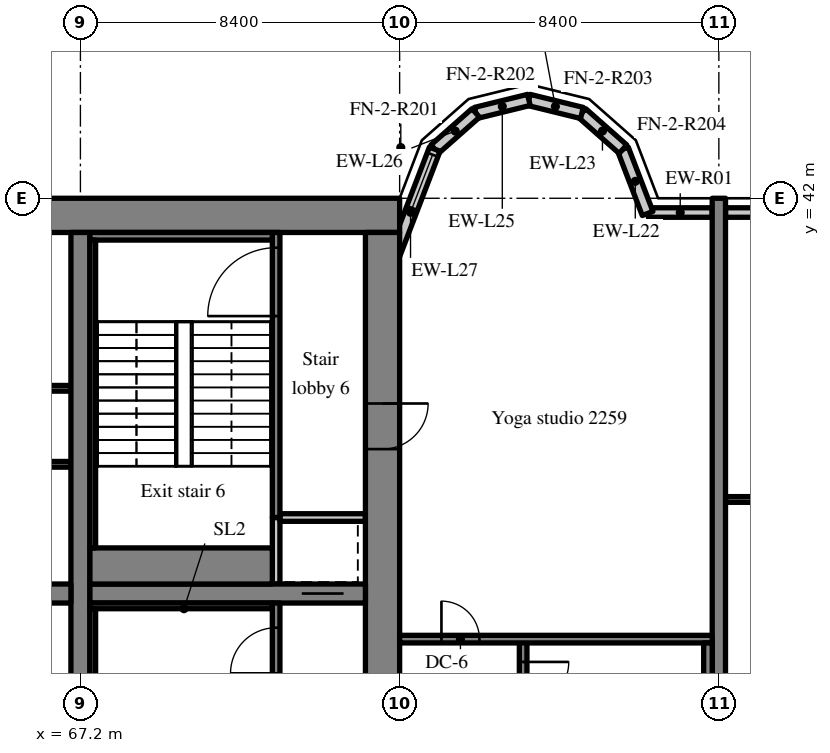
"""IFC4 building model, lengths in metres.
Left out: names, types, materials, properties, quantities, classifications, styles, units other than length and angle.
Written with IfcOpenShell. Run it as: python <this file> out.ifc"""

import sys

from ifc_helpers import new_model, si_unit, direction, frame, frame_2d, origin, place, context, subcontext, project, spatial, rectangle, extrude, source, transform, mapped, element, fill, save


model = new_model("IFC4")
c1 = context("Model", 3, precision=1e-05, world=origin(), true_north=direction((0.0, 1.0)))
c2 = subcontext(c1, "Body", "Model", "MODEL_VIEW")
j1 = project(units=[si_unit("LENGTHUNIT", "METRE"), si_unit("PLANEANGLEUNIT", "RADIAN")], contexts=[c1])
p1 = place(None, origin())
s1 = spatial("IfcSite", under=j1, at=p1, CompositionType="ELEMENT")
p2 = place(p1, origin())
s2 = spatial("IfcBuilding", under=s1, at=p2, CompositionType="ELEMENT")
p3 = place(p2, frame((0.0, 0.0, 95.2)))
s3 = spatial("IfcBuildingStorey", under=s2, at=p3, CompositionType="ELEMENT", Elevation=95.2)
m1 = source(origin(), c2, "Body", "SweptSolid", [
    extrude(rectangle(XDim=50.4, YDim=0.9, at=frame_2d((25.2, 0.0))), origin(), (0.0, 0.0, 1.0), 3.52),
])
p4 = place(p3, frame((25.2, 41.55, 0.0), z_axis=(0.0, 0.0, 1.0), x_axis=(1.0, 0.0, 0.0)))
e1 = element("IfcWall", 1, at=p4, inside=s3, PredefinedType="SHEAR", context=c2, shape_type="MappedRepresentation", body=[
    mapped(m1, transform((0.0, 0.0, 0.0), scale=1.0)),
])
m2 = source(origin(), c2, "Body", "SweptSolid", [
    extrude(rectangle(XDim=18.2, YDim=0.9, at=frame_2d((9.1, 0.0))), origin(), (0.0, 0.0, 1.0), 3.52),
])
p5 = place(p3, frame((75.15, 22.9, 0.0), z_axis=(0.0, 0.0, 1.0), x_axis=(0.0, 1.0, 0.0)))
e2 = element("IfcWall", 2, at=p5, inside=s3, PredefinedType="SHEAR", context=c2, shape_type="MappedRepresentation", body=[
    mapped(m2, transform((0.0, 0.0, 0.0), scale=1.0)),
])
m3 = source(origin(), c2, "Body", "SweptSolid", [
    extrude(rectangle(XDim=1.2, YDim=2.1, at=frame_2d((0.6, 1.05))), frame((0.0, 0.46, 0.0), z_axis=(0.0, -1.0, 0.0), x_axis=(1.0, 0.0, 0.0)), (0.0, 0.0, 1.0), 0.92),
])
p6 = place(p5, frame((12.5, 0.0, 0.0)))
e3 = element("IfcOpeningElement", 3, at=p6, cuts=e2, PredefinedType="OPENING", context=c2, shape_type="MappedRepresentation", body=[
    mapped(m3, transform((0.0, 0.0, 0.0), scale=1.0)),
])
m4 = source(origin(), c2, "Body", "SweptSolid", [
    extrude(rectangle(XDim=18.2, YDim=0.5, at=frame_2d((9.1, 0.0))), origin(), (0.0, 0.0, 1.0), 3.52),
])
p7 = place(p3, frame((67.2, 22.9, 0.0), z_axis=(0.0, 0.0, 1.0), x_axis=(0.0, 1.0, 0.0)))
e4 = element("IfcWall", 4, at=p7, inside=s3, PredefinedType="SHEAR", context=c2, shape_type="MappedRepresentation", body=[
    mapped(m4, transform((0.0, 0.0, 0.0), scale=1.0)),
])
m5 = source(origin(), c2, "Body", "SweptSolid", [
    extrude(rectangle(XDim=16.3, YDim=0.5, at=frame_2d((8.15, 0.0))), origin(), (0.0, 0.0, 1.0), 3.52),
])
p8 = place(p3, frame((50.65, 31.6, 0.0), z_axis=(0.0, 0.0, 1.0), x_axis=(1.0, 0.0, 0.0)))
e5 = element("IfcWall", 5, at=p8, inside=s3, PredefinedType="SHEAR", context=c2, shape_type="MappedRepresentation", body=[
    mapped(m5, transform((0.0, 0.0, 0.0), scale=1.0)),
])
m6 = source(origin(), c2, "Body", "SweptSolid", [
    extrude(rectangle(XDim=1.0, YDim=2.1, at=frame_2d((0.5, 1.05))), frame((0.0, 0.26, 0.0), z_axis=(0.0, -1.0, 0.0), x_axis=(1.0, 0.0, 0.0)), (0.0, 0.0, 1.0), 0.52),
])
p9 = place(p8, frame((0.575, 0.0, 0.0)))
e6 = element("IfcOpeningElement", 6, at=p9, cuts=e5, PredefinedType="OPENING", context=c2, shape_type="MappedRepresentation", body=[
    mapped(m6, transform((0.0, 0.0, 0.0), scale=1.0)),
])
m7 = source(origin(), c2, "Body", "SweptSolid", [
    extrude(rectangle(XDim=7.25, YDim=0.5, at=frame_2d((3.625, 0.0))), origin(), (0.0, 0.0, 1.0), 3.52),
])
p10 = place(p3, frame((67.45, 31.6, 0.0), z_axis=(0.0, 0.0, 1.0), x_axis=(1.0, 0.0, 0.0)))
e7 = element("IfcWall", 7, at=p10, inside=s3, PredefinedType="SHEAR", context=c2, shape_type="MappedRepresentation", body=[
    mapped(m7, transform((0.0, 0.0, 0.0), scale=1.0)),
])
m8 = source(origin(), c2, "Body", "SweptSolid", [
    extrude(rectangle(XDim=1.1, YDim=2.1, at=frame_2d((0.55, 1.05))), frame((0.0, 0.26, 0.0), z_axis=(0.0, -1.0, 0.0), x_axis=(1.0, 0.0, 0.0)), (0.0, 0.0, 1.0), 0.52),
])
p11 = place(p10, frame((5.575, 0.0, 0.0)))
e8 = element("IfcOpeningElement", 8, at=p11, cuts=e7, PredefinedType="OPENING", context=c2, shape_type="MappedRepresentation", body=[
    mapped(m8, transform((0.0, 0.0, 0.0), scale=1.0)),
])
m9 = source(origin(), c2, "Body", "SweptSolid", [
    extrude(rectangle(XDim=20.0, YDim=0.35, at=frame_2d((10.0, 0.0))), origin(), (0.0, 0.0, 1.0), 3.52),
])
p12 = place(p3, frame((84.0, 22.0, 0.0), z_axis=(0.0, 0.0, 1.0), x_axis=(0.0, 1.0, 0.0)))
e9 = element("IfcWall", 9, at=p12, inside=s3, PredefinedType="SHEAR", context=c2, shape_type="MappedRepresentation", body=[
    mapped(m9, transform((0.0, 0.0, 0.0), scale=1.0)),
])
m10 = source(origin(), c2, "Body", "SweptSolid", [
    extrude(rectangle(XDim=1.683, YDim=0.25, at=frame_2d((0.841, 0.0))), origin(), (0.0, 0.0, 1.0), 2.82),
])
p13 = place(p3, frame((83.825, 41.625, 0.0), z_axis=(0.0, 0.0, 1.0), x_axis=(-1.0, 0.0, 0.0)))
e10 = element("IfcWall", 10, at=p13, inside=s3, PredefinedType="SOLIDWALL", context=c2, shape_type="MappedRepresentation", body=[
    mapped(m10, transform((0.0, 0.0, 0.0), scale=1.0)),
])
m11 = source(origin(), c2, "Body", "SweptSolid", [
    extrude(rectangle(XDim=3.675, YDim=0.25, at=frame_2d((1.837, 0.0))), origin(), (0.0, 0.0, 1.0), 2.82),
])
p14 = place(p3, frame((87.85, 41.625, 0.0), z_axis=(0.0, 0.0, 1.0), x_axis=(-1.0, 0.0, 0.0)))
e11 = element("IfcWall", 11, at=p14, inside=s3, PredefinedType="SOLIDWALL", context=c2, shape_type="MappedRepresentation", body=[
    mapped(m11, transform((0.0, 0.0, 0.0), scale=1.0)),
])
m12 = source(origin(), c2, "Body", "SweptSolid", [
    extrude(rectangle(XDim=1.5, YDim=1.5, at=frame_2d((0.75, 0.75))), frame((0.0, 0.135, 0.0), z_axis=(0.0, -1.0, 0.0), x_axis=(1.0, 0.0, 0.0)), (0.0, 0.0, 1.0), 0.27),
])
p15 = place(p14, frame((1.087, 0.0, 0.9)))
e12 = element("IfcOpeningElement", 12, at=p15, cuts=e11, PredefinedType="OPENING", context=c2, shape_type="MappedRepresentation", body=[
    mapped(m12, transform((0.0, 0.0, 0.0), scale=1.0)),
])
m13 = source(origin(), c2, "Body", "SweptSolid", [
    extrude(rectangle(XDim=1.812, YDim=0.3, at=frame_2d((0.906, 0.0))), origin(), (0.0, 0.0, 1.0), 3.52),
])
p16 = place(p3, frame((82.125, 41.6, 0.0), z_axis=(0.0, 0.0, 1.0), x_axis=(-0.357877270961, 0.93376863244, 0.0)))
e13 = element("IfcWall", 13, at=p16, inside=s3, PredefinedType="SOLIDWALL", context=c2, shape_type="MappedRepresentation", body=[
    mapped(m13, transform((0.0, 0.0, 0.0), scale=1.0)),
])
m14 = source(origin(), c2, "Body", "SweptSolid", [
    extrude(rectangle(XDim=1.44, YDim=0.3, at=frame_2d((0.72, 0.0))), origin(), (0.0, 0.0, 1.0), 3.52),
])
p17 = place(p3, frame((81.477, 43.292, 0.0), z_axis=(0.0, 0.0, 1.0), x_axis=(-0.74957555648, 0.661918790432, 0.0)))
e14 = element("IfcWall", 14, at=p17, inside=s3, PredefinedType="SOLIDWALL", context=c2, shape_type="MappedRepresentation", body=[
    mapped(m14, transform((0.0, 0.0, 0.0), scale=1.0)),
])
m15 = source(origin(), c2, "Body", "SweptSolid", [
    extrude(rectangle(XDim=1.439, YDim=0.3, at=frame_2d((0.719, 0.0))), origin(), (0.0, 0.0, 1.0), 3.52),
])
for number, where, z_axis, x_axis in (
    (15, (80.397, 44.245, 0.0), (0.0, 0.0, 1.0), (-0.971, 0.238, 0.0)),
    (16, (79.0, 44.588, 0.0), (0.0, 0.0, 1.0), (-0.971, -0.238, 0.0)),
):
    element("IfcWall", number, at=place(p3, frame(where, z_axis=z_axis, x_axis=x_axis)), inside=s3, PredefinedType="SOLIDWALL", context=c2, shape_type="MappedRepresentation", body=[
        mapped(m15, transform((0.0, 0.0, 0.0), scale=1.0)),
    ])
p18 = place(p3, frame((77.603, 44.245, 0.0), z_axis=(0.0, 0.0, 1.0), x_axis=(-0.74957555648, -0.661918790432, 0.0)))
e17 = element("IfcWall", 17, at=p18, inside=s3, PredefinedType="SOLIDWALL", context=c2, shape_type="MappedRepresentation", body=[
    mapped(m14, transform((0.0, 0.0, 0.0), scale=1.0)),
])
m16 = source(origin(), c2, "Body", "SweptSolid", [
    extrude(rectangle(XDim=3.559, YDim=0.3, at=frame_2d((1.78, 0.0))), origin(), (0.0, 0.0, 1.0), 3.52),
])
p19 = place(p3, frame((76.523, 43.292, 0.0), z_axis=(0.0, 0.0, 1.0), x_axis=(-0.35779745313, -0.933799219604, 0.0)))
e18 = element("IfcWall", 18, at=p19, inside=s3, PredefinedType="SOLIDWALL", context=c2, shape_type="MappedRepresentation", body=[
    mapped(m16, transform((0.0, 0.0, 0.0), scale=1.0)),
])
m17 = source(origin(), c2, "Body", "SweptSolid", [
    extrude(rectangle(XDim=1.5, YDim=2.0, at=frame_2d((0.75, 1.0))), frame((0.0, 0.16, 0.0), z_axis=(0.0, -1.0, 0.0), x_axis=(1.0, 0.0, 0.0)), (0.0, 0.0, 1.0), 0.32),
])
p20 = place(p19, frame((0.156, 0.0, 0.9)))
e19 = element("IfcOpeningElement", 19, at=p20, cuts=e18, PredefinedType="OPENING", context=c2, shape_type="MappedRepresentation", body=[
    mapped(m17, transform((0.0, 0.0, 0.0), scale=1.0)),
])
m18 = source(origin(), c2, "Body", "SweptSolid", [
    extrude(rectangle(XDim=14.15, YDim=0.15, at=frame_2d((7.075, 0.0))), origin(), (0.0, 0.0, 1.0), 3.52),
])
p21 = place(p3, frame((66.95, 35.0, 0.0), z_axis=(0.0, 0.0, 1.0), x_axis=(-1.0, 0.0, 0.0)))
e20 = element("IfcWall", 20, at=p21, inside=s3, PredefinedType="PARTITIONING", context=c2, shape_type="MappedRepresentation", body=[
    mapped(m18, transform((0.0, 0.0, 0.0), scale=1.0)),
])
m19 = source(origin(), c2, "Body", "SweptSolid", [
    extrude(rectangle(XDim=0.9, YDim=2.1, at=frame_2d((0.45, 1.05))), frame((0.0, 0.085, 0.0), z_axis=(0.0, -1.0, 0.0), x_axis=(1.0, 0.0, 0.0)), (0.0, 0.0, 1.0), 0.17),
])
p22 = place(p21, frame((0.958, 0.0, 0.0)))
e21 = element("IfcOpeningElement", 21, at=p22, cuts=e20, PredefinedType="OPENING", context=c2, shape_type="MappedRepresentation", body=[
    mapped(m19, transform((0.0, 0.0, 0.0), scale=1.0)),
])
p23 = place(p21, frame((5.884, 0.0, 0.0)))
e22 = element("IfcOpeningElement", 22, at=p23, cuts=e20, PredefinedType="OPENING", context=c2, shape_type="MappedRepresentation", body=[
    mapped(m19, transform((0.0, 0.0, 0.0), scale=1.0)),
])
p24 = place(p21, frame((11.514, 0.0, 0.0)))
e23 = element("IfcOpeningElement", 23, at=p24, cuts=e20, PredefinedType="OPENING", context=c2, shape_type="MappedRepresentation", body=[
    mapped(m19, transform((0.0, 0.0, 0.0), scale=1.0)),
])
m20 = source(origin(), c2, "Body", "SweptSolid", [
    extrude(rectangle(XDim=16.3, YDim=0.15, at=frame_2d((8.15, 0.0))), origin(), (0.0, 0.0, 1.0), 3.52),
])
p25 = place(p3, frame((66.95, 37.0, 0.0), z_axis=(0.0, 0.0, 1.0), x_axis=(-1.0, 0.0, 0.0)))
e24 = element("IfcWall", 24, at=p25, inside=s3, PredefinedType="PARTITIONING", context=c2, shape_type="MappedRepresentation", body=[
    mapped(m20, transform((0.0, 0.0, 0.0), scale=1.0)),
])
p26 = place(p25, frame((0.773, 0.0, 0.0)))
e25 = element("IfcOpeningElement", 25, at=p26, cuts=e24, PredefinedType="OPENING", context=c2, shape_type="MappedRepresentation", body=[
    mapped(m19, transform((0.0, 0.0, 0.0), scale=1.0)),
])
p27 = place(p25, frame((3.625, 0.0, 0.0)))
e26 = element("IfcOpeningElement", 26, at=p27, cuts=e24, PredefinedType="OPENING", context=c2, shape_type="MappedRepresentation", body=[
    mapped(m19, transform((0.0, 0.0, 0.0), scale=1.0)),
])
p28 = place(p25, frame((9.33, 0.0, 0.0)))
e27 = element("IfcOpeningElement", 27, at=p28, cuts=e24, PredefinedType="OPENING", context=c2, shape_type="MappedRepresentation", body=[
    mapped(m19, transform((0.0, 0.0, 0.0), scale=1.0)),
])
p29 = place(p25, frame((14.627, 0.0, 0.0)))
e28 = element("IfcOpeningElement", 28, at=p29, cuts=e24, PredefinedType="OPENING", context=c2, shape_type="MappedRepresentation", body=[
    mapped(m19, transform((0.0, 0.0, 0.0), scale=1.0)),
])
m21 = source(origin(), c2, "Body", "SweptSolid", [
    extrude(rectangle(XDim=8.45, YDim=0.2, at=frame_2d((4.225, 0.0))), origin(), (0.0, 0.0, 1.0), 3.52),
])
p30 = place(p3, frame((72.35, 22.9, 0.0), z_axis=(0.0, 0.0, 1.0), x_axis=(0.0, 1.0, 0.0)))
e29 = element("IfcWall", 29, at=p30, inside=s3, PredefinedType="SOLIDWALL", context=c2, shape_type="MappedRepresentation", body=[
    mapped(m21, transform((0.0, 0.0, 0.0), scale=1.0)),
])
m22 = source(origin(), c2, "Body", "SweptSolid", [
    extrude(rectangle(XDim=1.2, YDim=2.1, at=frame_2d((0.6, 1.05))), frame((0.0, 0.11, 0.0), z_axis=(0.0, -1.0, 0.0), x_axis=(1.0, 0.0, 0.0)), (0.0, 0.0, 1.0), 0.22),
])
p31 = place(p30, frame((6.6, 0.0, 0.0)))
e30 = element("IfcOpeningElement", 30, at=p31, cuts=e29, PredefinedType="OPENING", context=c2, shape_type="MappedRepresentation", body=[
    mapped(m22, transform((0.0, 0.0, 0.0), scale=1.0)),
])
m23 = source(origin(), c2, "Body", "SweptSolid", [
    extrude(rectangle(XDim=1.75, YDim=0.2, at=frame_2d((0.875, 0.0))), origin(), (0.0, 0.0, 1.0), 3.52),
])
p32 = place(p3, frame((72.35, 31.85, 0.0), z_axis=(0.0, 0.0, 1.0), x_axis=(0.0, 1.0, 0.0)))
e31 = element("IfcWall", 31, at=p32, inside=s3, PredefinedType="SOLIDWALL", context=c2, shape_type="MappedRepresentation", body=[
    mapped(m23, transform((0.0, 0.0, 0.0), scale=1.0)),
])
m24 = source(origin(), c2, "Body", "SweptSolid", [
    extrude(rectangle(XDim=2.25, YDim=0.2, at=frame_2d((1.125, 0.0))), origin(), (0.0, 0.0, 1.0), 3.52),
])
p33 = place(p3, frame((72.45, 33.6, 0.0), z_axis=(0.0, 0.0, 1.0), x_axis=(1.0, 0.0, 0.0)))
e32 = element("IfcWall", 32, at=p33, inside=s3, PredefinedType="SOLIDWALL", context=c2, shape_type="MappedRepresentation", body=[
    mapped(m24, transform((0.0, 0.0, 0.0), scale=1.0)),
])
m25 = source(origin(), c2, "Body", "SweptSolid", [
    extrude(rectangle(XDim=7.5, YDim=0.2, at=frame_2d((3.75, 0.0))), origin(), (0.0, 0.0, 1.0), 3.52),
])
p34 = place(p3, frame((72.35, 33.6, 0.0), z_axis=(0.0, 0.0, 1.0), x_axis=(0.0, 1.0, 0.0)))
e33 = element("IfcWall", 33, at=p34, inside=s3, PredefinedType="SOLIDWALL", context=c2, shape_type="MappedRepresentation", body=[
    mapped(m25, transform((0.0, 0.0, 0.0), scale=1.0)),
])
m26 = source(origin(), c2, "Body", "SweptSolid", [
    extrude(rectangle(XDim=1.8, YDim=2.1, at=frame_2d((0.9, 1.05))), frame((0.0, 0.11, 0.0), z_axis=(0.0, -1.0, 0.0), x_axis=(1.0, 0.0, 0.0)), (0.0, 0.0, 1.0), 0.22),
])
p35 = place(p34, frame((5.3, 0.0, 0.0)))
e34 = element("IfcOpeningElement", 34, at=p35, cuts=e33, PredefinedType="OPENING", context=c2, shape_type="MappedRepresentation", body=[
    mapped(m26, transform((0.0, 0.0, 0.0), scale=1.0)),
])
m27 = source(origin(), c2, "Body", "SweptSolid", [
    extrude(rectangle(XDim=8.3, YDim=0.2, at=frame_2d((4.15, 0.0))), origin(), (0.0, 0.0, 1.0), 3.52),
])
p36 = place(p3, frame((78.85, 22.1, 0.0), z_axis=(0.0, 0.0, 1.0), x_axis=(0.0, 1.0, 0.0)))
e35 = element("IfcWall", 35, at=p36, inside=s3, PredefinedType="SOLIDWALL", context=c2, shape_type="MappedRepresentation", body=[
    mapped(m27, transform((0.0, 0.0, 0.0), scale=1.0)),
])
p37 = place(p36, frame((6.5, 0.0, 0.0)))
e36 = element("IfcOpeningElement", 36, at=p37, cuts=e35, PredefinedType="OPENING", context=c2, shape_type="MappedRepresentation", body=[
    mapped(m22, transform((0.0, 0.0, 0.0), scale=1.0)),
])
m28 = source(origin(), c2, "Body", "SweptSolid", [
    extrude(rectangle(XDim=8.225, YDim=0.2, at=frame_2d((4.112, 0.0))), origin(), (0.0, 0.0, 1.0), 3.52),
])
p38 = place(p3, frame((83.825, 30.4, 0.0), z_axis=(0.0, 0.0, 1.0), x_axis=(-1.0, 0.0, 0.0)))
e37 = element("IfcWall", 37, at=p38, inside=s3, PredefinedType="SOLIDWALL", context=c2, shape_type="MappedRepresentation", body=[
    mapped(m28, transform((0.0, 0.0, 0.0), scale=1.0)),
])
m29 = source(origin(), c2, "Body", "SweptSolid", [
    extrude(rectangle(XDim=1.0, YDim=2.1, at=frame_2d((0.5, 1.05))), frame((0.0, 0.11, 0.0), z_axis=(0.0, -1.0, 0.0), x_axis=(1.0, 0.0, 0.0)), (0.0, 0.0, 1.0), 0.22),
])
p39 = place(p38, frame((6.125, 0.0, 0.0)))
e38 = element("IfcOpeningElement", 38, at=p39, cuts=e37, PredefinedType="OPENING", context=c2, shape_type="MappedRepresentation", body=[
    mapped(m29, transform((0.0, 0.0, 0.0), scale=1.0)),
])
m30 = source(origin(), c2, "Body", "SweptSolid", [
    extrude(rectangle(XDim=4.8, YDim=0.15, at=frame_2d((2.4, 0.0))), origin(), (0.0, 0.0, 1.0), 3.52),
])
p40 = place(p3, frame((67.45, 31.275, 0.0), z_axis=(0.0, 0.0, 1.0), x_axis=(1.0, 0.0, 0.0)))
e39 = element("IfcWall", 39, at=p40, inside=s3, PredefinedType="SOLIDWALL", context=c2, shape_type="MappedRepresentation", body=[
    mapped(m30, transform((0.0, 0.0, 0.0), scale=1.0)),
])
m31 = source(origin(), c2, "Body", "SweptSolid", [
    extrude(rectangle(XDim=8.1, YDim=0.15, at=frame_2d((4.05, 0.0))), origin(), (0.0, 0.0, 1.0), 3.52),
])
p41 = place(p3, frame((67.525, 23.1, 0.0), z_axis=(0.0, 0.0, 1.0), x_axis=(0.0, 1.0, 0.0)))
e40 = element("IfcWall", 40, at=p41, inside=s3, PredefinedType="SOLIDWALL", context=c2, shape_type="MappedRepresentation", body=[
    mapped(m31, transform((0.0, 0.0, 0.0), scale=1.0)),
])
m32 = source(origin(), c2, "Body", "SweptSolid", [
    extrude(rectangle(XDim=4.8, YDim=0.2, at=frame_2d((2.4, 0.0))), origin(), (0.0, 0.0, 1.0), 3.52),
])
p42 = place(p3, frame((67.45, 41.0, 0.0), z_axis=(0.0, 0.0, 1.0), x_axis=(1.0, 0.0, 0.0)))
e41 = element("IfcWall", 41, at=p42, inside=s3, PredefinedType="SOLIDWALL", context=c2, shape_type="MappedRepresentation", body=[
    mapped(m32, transform((0.0, 0.0, 0.0), scale=1.0)),
])
m33 = source(origin(), c2, "Body", "SweptSolid", [
    extrude(rectangle(XDim=4.8, YDim=0.95, at=frame_2d((2.4, 0.0))), origin(), (0.0, 0.0, 1.0), 3.52),
])
p43 = place(p3, frame((67.45, 32.325, 0.0), z_axis=(0.0, 0.0, 1.0), x_axis=(1.0, 0.0, 0.0)))
e42 = element("IfcWall", 42, at=p43, inside=s3, PredefinedType="SOLIDWALL", context=c2, shape_type="MappedRepresentation", body=[
    mapped(m33, transform((0.0, 0.0, 0.0), scale=1.0)),
])
p44 = place(p3, frame((67.525, 32.8, 0.0), z_axis=(0.0, 0.0, 1.0), x_axis=(0.0, 1.0, 0.0)))
e43 = element("IfcWall", 43, at=p44, inside=s3, PredefinedType="SOLIDWALL", context=c2, shape_type="MappedRepresentation", body=[
    mapped(m31, transform((0.0, 0.0, 0.0), scale=1.0)),
])
m34 = source(origin(), c2, "Body", "SweptSolid", [
    extrude(rectangle(XDim=8.1, YDim=0.225, at=frame_2d((4.05, 0.0))), origin(), (0.0, 0.0, 1.0), 3.52),
])
p45 = place(p3, frame((83.713, 22.2, 0.0), z_axis=(0.0, 0.0, 1.0), x_axis=(0.0, 1.0, 0.0)))
e44 = element("IfcWall", 44, at=p45, inside=s3, PredefinedType="SOLIDWALL", context=c2, shape_type="MappedRepresentation", body=[
    mapped(m34, transform((0.0, 0.0, 0.0), scale=1.0)),
])
m35 = source(origin(), c2, "Body", "SweptSolid", [
    extrude(rectangle(XDim=8.05, YDim=0.15, at=frame_2d((4.025, 0.0))), origin(), (0.0, 0.0, 1.0), 3.52),
])
p46 = place(p3, frame((84.175, 34.075, 0.0), z_axis=(0.0, 0.0, 1.0), x_axis=(1.0, 0.0, 0.0)))
e45 = element("IfcWall", 45, at=p46, inside=s3, PredefinedType="PARTITIONING", context=c2, shape_type="MappedRepresentation", body=[
    mapped(m35, transform((0.0, 0.0, 0.0), scale=1.0)),
])
m36 = source(origin(), c2, "Body", "SweptSolid", [
    extrude(rectangle(XDim=1.0, YDim=2.1, at=frame_2d((0.5, 1.05))), frame((0.0, 0.085, 0.0), z_axis=(0.0, -1.0, 0.0), x_axis=(1.0, 0.0, 0.0)), (0.0, 0.0, 1.0), 0.17),
])
p47 = place(p46, frame((0.7, 0.0, 0.0)))
e46 = element("IfcOpeningElement", 46, at=p47, cuts=e45, PredefinedType="OPENING", context=c2, shape_type="MappedRepresentation", body=[
    mapped(m36, transform((0.0, 0.0, 0.0), scale=1.0)),
])
m37 = source(origin(), c2, "Body", "SweptSolid", [
    extrude(rectangle(XDim=1.5, YDim=2.0, at=frame_2d((0.75, 1.0))), frame((0.0, 0.03, 0.0), z_axis=(0.0, -1.0, 0.0), x_axis=(1.0, 0.0, 0.0)), (0.0, 0.0, 1.0), 0.06),
])
p48 = place(p20, origin())
e47 = element("IfcWindow", 47, at=p48, inside=s3, PartitioningType="SINGLE_PANEL", PredefinedType="WINDOW", context=c2, shape_type="MappedRepresentation", body=[
    mapped(m37, transform((0.0, 0.0, 0.0), scale=1.0)),
])
fill(e19, e47)
m38 = source(origin(), c2, "Body", "SweptSolid", [
    extrude(rectangle(XDim=1.2, YDim=2.1, at=frame_2d((0.6, 1.05))), frame((0.0, 0.025, 0.0), z_axis=(0.0, -1.0, 0.0), x_axis=(1.0, 0.0, 0.0)), (0.0, 0.0, 1.0), 0.05),
])
p49 = place(p31, origin())
e48 = element("IfcDoor", 48, at=p49, inside=s3, OperationType="SINGLE_SWING_LEFT", PredefinedType="DOOR", context=c2, shape_type="MappedRepresentation", body=[
    mapped(m38, transform((0.0, 0.0, 0.0), scale=1.0)),
])
fill(e30, e48)
m39 = source(origin(), c2, "Body", "SweptSolid", [
    extrude(rectangle(XDim=1.1, YDim=2.1, at=frame_2d((0.55, 1.05))), frame((0.0, 0.025, 0.0), z_axis=(0.0, -1.0, 0.0), x_axis=(1.0, 0.0, 0.0)), (0.0, 0.0, 1.0), 0.05),
])
p50 = place(p11, origin())
e49 = element("IfcDoor", 49, at=p50, inside=s3, OperationType="SLIDING_TO_RIGHT", PredefinedType="DOOR", context=c2, shape_type="MappedRepresentation", body=[
    mapped(m39, transform((0.0, 0.0, 0.0), scale=1.0)),
])
fill(e8, e49)
m40 = source(origin(), c2, "Body", "SweptSolid", [
    extrude(rectangle(XDim=1.8, YDim=2.1, at=frame_2d((0.9, 1.05))), frame((0.0, 0.025, 0.0), z_axis=(0.0, -1.0, 0.0), x_axis=(1.0, 0.0, 0.0)), (0.0, 0.0, 1.0), 0.05),
])
p51 = place(p35, origin())
e50 = element("IfcDoor", 50, at=p51, inside=s3, OperationType="SINGLE_SWING_LEFT", PredefinedType="DOOR", context=c2, shape_type="MappedRepresentation", body=[
    mapped(m40, transform((0.0, 0.0, 0.0), scale=1.0)),
])
fill(e34, e50)
p52 = place(p6, origin())
e51 = element("IfcDoor", 51, at=p52, inside=s3, OperationType="SINGLE_SWING_RIGHT", PredefinedType="DOOR", context=c2, shape_type="MappedRepresentation", body=[
    mapped(m38, transform((0.0, 0.0, 0.0), scale=1.0)),
])
fill(e3, e51)
p53 = place(p37, origin())
e52 = element("IfcDoor", 52, at=p53, inside=s3, OperationType="SINGLE_SWING_RIGHT", PredefinedType="DOOR", context=c2, shape_type="MappedRepresentation", body=[
    mapped(m38, transform((0.0, 0.0, 0.0), scale=1.0)),
])
fill(e36, e52)
m41 = source(origin(), c2, "Body", "SweptSolid", [
    extrude(rectangle(XDim=1.0, YDim=2.1, at=frame_2d((0.5, 1.05))), frame((0.0, 0.025, 0.0), z_axis=(0.0, -1.0, 0.0), x_axis=(1.0, 0.0, 0.0)), (0.0, 0.0, 1.0), 0.05),
])
p54 = place(p39, origin())
e53 = element("IfcDoor", 53, at=p54, inside=s3, OperationType="SINGLE_SWING_RIGHT", PredefinedType="DOOR", context=c2, shape_type="MappedRepresentation", body=[
    mapped(m41, transform((0.0, 0.0, 0.0), scale=1.0)),
])
fill(e38, e53)
save(model, sys.argv[1])
